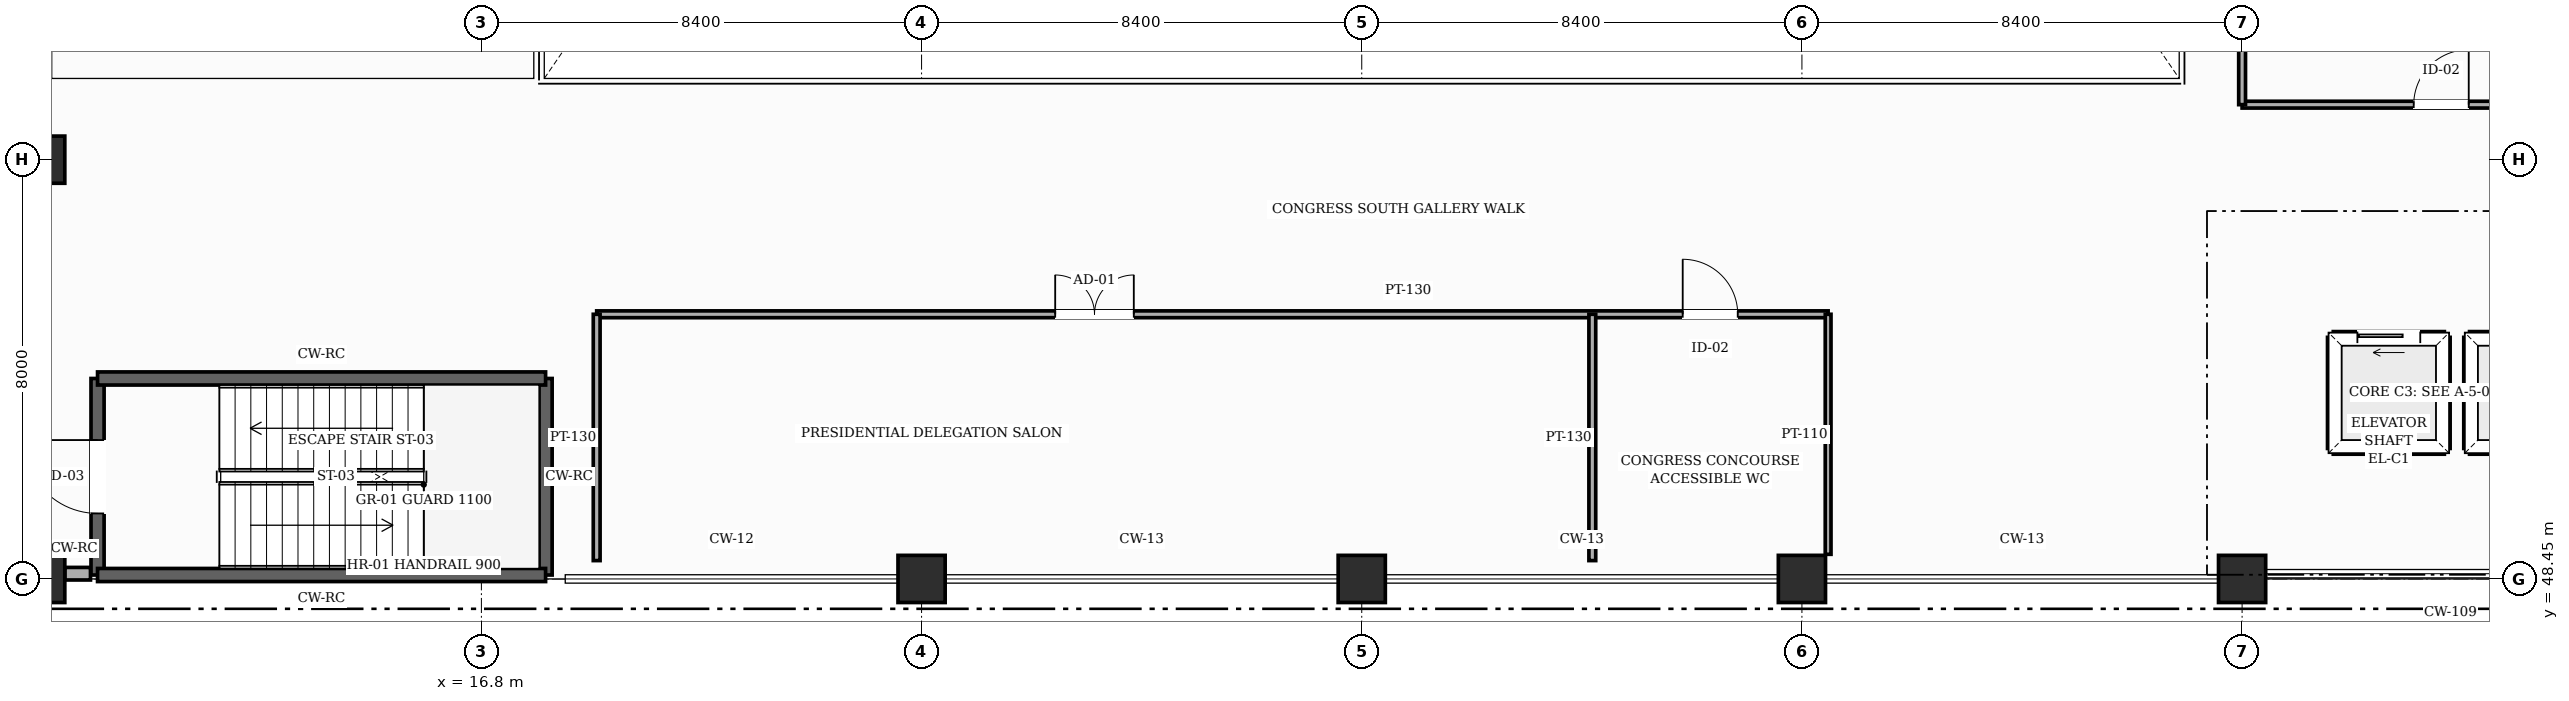
"""IFC4 building model, lengths in metres.
Left out: names, types, materials, properties, quantities, classifications, styles, units other than length and angle.
Written with IfcOpenShell. Run it as: python <this file> out.ifc"""

import sys

from ifc_helpers import new_model, si_unit, direction, frame, frame_2d, origin, origin_2d, place, context, subcontext, project, spatial, rectangle, hollow_rectangle, extrude, element, fill, save


model = new_model("IFC4")
c1 = context("Model", 3, precision=1e-05, world=origin(), true_north=direction((0.0, 1.0)))
c2 = subcontext(c1, "Body", "Model", "MODEL_VIEW")
j1 = project(units=[si_unit("LENGTHUNIT", "METRE"), si_unit("PLANEANGLEUNIT", "RADIAN")], contexts=[c1])
p1 = place(None, origin())
s1 = spatial("IfcSite", under=j1, at=p1, CompositionType="ELEMENT")
p2 = place(p1, origin())
s2 = spatial("IfcBuilding", under=s1, at=p2, CompositionType="ELEMENT")
p3 = place(p2, frame((0.0, 0.0, 5.4)))
s3 = spatial("IfcBuildingStorey", under=s2, at=p3, CompositionType="ELEMENT", Elevation=5.4)
for number, where, z_axis, x_axis in (
    (1, (8.4, 48.45, 0.0), (0.0, 0.0, 1.0), (1.0, 0.0, 0.0)),
    (2, (8.4, 56.45, 0.0), (0.0, 0.0, 1.0), (1.0, 0.0, 0.0)),
    (3, (25.2, 48.45, 0.0), (0.0, 0.0, 1.0), (1.0, 0.0, 0.0)),
    (4, (33.6, 48.45, 0.0), (0.0, 0.0, 1.0), (1.0, 0.0, 0.0)),
    (5, (42.0, 48.45, 0.0), (0.0, 0.0, 1.0), (1.0, 0.0, 0.0)),
    (6, (50.4, 48.45, 0.0), (0.0, 0.0, 1.0), (1.0, 0.0, 0.0)),
):
    element("IfcColumn", number, at=place(p3, frame(where, z_axis=z_axis, x_axis=x_axis)), inside=s3, PredefinedType="COLUMN", context=c2, shape_type="SweptSolid", body=[
        extrude(hollow_rectangle(XDim=0.9, YDim=0.9, WallThickness=0.032, InnerFilletRadius=0.032, OuterFilletRadius=0.064, at=origin_2d()), origin(), (0.0, 0.0, 1.0), 4.8),
    ])
p4 = place(p3, frame((9.34, 48.55, 0.0), z_axis=(0.0, 0.0, 1.0), x_axis=(-1.0, 0.0, 0.0)))
e7 = element("IfcWall", 7, at=p4, inside=s3, PredefinedType="SOLIDWALL", context=c2, shape_type="SweptSolid", body=[
    extrude(rectangle(XDim=0.49, YDim=0.24, at=frame_2d((0.245, 0.0))), origin(), (0.0, 0.0, 1.0), 3.525),
])
p5 = place(p3, frame((9.475, 48.525, 0.0), z_axis=(0.0, 0.0, 1.0), x_axis=(0.0, 1.0, 0.0)))
e8 = element("IfcWall", 8, at=p5, inside=s3, PredefinedType="SHEAR", context=c2, shape_type="SweptSolid", body=[
    extrude(rectangle(XDim=3.75, YDim=0.25, at=frame_2d((1.875, 0.0))), origin(), (0.0, 0.0, 1.0), 4.55),
])
p6 = place(p5, frame((1.175, 0.0, 0.0)))
e9 = element("IfcOpeningElement", 9, at=p6, cuts=e8, PredefinedType="OPENING", context=c2, shape_type="SweptSolid", body=[
    extrude(rectangle(XDim=1.4, YDim=2.25, at=frame_2d((0.7, 1.125))), frame((0.0, 0.135, 0.0), z_axis=(0.0, -1.0, 0.0), x_axis=(1.0, 0.0, 0.0)), (0.0, 0.0, 1.0), 0.27),
])
p7 = place(p3, frame((18.025, 52.275, 0.0), z_axis=(0.0, 0.0, 1.0), x_axis=(0.0, -1.0, 0.0)))
e10 = element("IfcWall", 10, at=p7, inside=s3, PredefinedType="SHEAR", context=c2, shape_type="SweptSolid", body=[
    extrude(rectangle(XDim=3.75, YDim=0.25, at=frame_2d((1.875, 0.0))), origin(), (0.0, 0.0, 1.0), 4.55),
])
for number, where, z_axis, x_axis in (
    (11, (18.025, 48.525, 0.0), (0.0, 0.0, 1.0), (-1.0, 0.0, 0.0)),
    (12, (9.475, 52.275, 0.0), (0.0, 0.0, 1.0), (1.0, 0.0, 0.0)),
):
    element("IfcWall", number, at=place(p3, frame(where, z_axis=z_axis, x_axis=x_axis)), inside=s3, PredefinedType="SHEAR", context=c2, shape_type="SweptSolid", body=[
        extrude(rectangle(XDim=8.55, YDim=0.25, at=frame_2d((4.275, 0.0))), origin(), (0.0, 0.0, 1.0), 4.55),
    ])
p8 = place(p3, frame((52.14, 53.06, 0.0), z_axis=(0.0, 0.0, 1.0), x_axis=(1.0, 0.0, 0.0)))
e13 = element("IfcWall", 13, at=p8, inside=s3, PredefinedType="SHEAR", context=c2, shape_type="SweptSolid", body=[
    extrude(rectangle(XDim=2.12, YDim=0.22, at=frame_2d((1.06, 0.0))), origin(), (0.0, 0.0, 1.0), 4.55),
])
p9 = place(p8, frame((0.46, 0.0, 0.0)))
e14 = element("IfcOpeningElement", 14, at=p9, cuts=e13, PredefinedType="OPENING", context=c2, shape_type="SweptSolid", body=[
    extrude(rectangle(XDim=1.2, YDim=2.25, at=frame_2d((0.6, 1.125))), frame((0.0, 0.12, 0.0), z_axis=(0.0, -1.0, 0.0), x_axis=(1.0, 0.0, 0.0)), (0.0, 0.0, 1.0), 0.24),
])
for number, where, z_axis, x_axis in (
    (15, (52.14, 50.94, 0.0), (0.0, 0.0, 1.0), (1.0, 0.0, 0.0)),
    (16, (54.26, 50.94, 0.0), (0.0, 0.0, 1.0), (0.0, 1.0, 0.0)),
    (17, (52.14, 50.94, 0.0), (0.0, 0.0, 1.0), (0.0, 1.0, 0.0)),
):
    element("IfcWall", number, at=place(p3, frame(where, z_axis=z_axis, x_axis=x_axis)), inside=s3, PredefinedType="SHEAR", context=c2, shape_type="SweptSolid", body=[
        extrude(rectangle(XDim=2.12, YDim=0.22, at=frame_2d((1.06, 0.0))), origin(), (0.0, 0.0, 1.0), 4.55),
    ])
p10 = place(p3, frame((54.74, 53.06, 0.0), z_axis=(0.0, 0.0, 1.0), x_axis=(1.0, 0.0, 0.0)))
e18 = element("IfcWall", 18, at=p10, inside=s3, PredefinedType="SHEAR", context=c2, shape_type="SweptSolid", body=[
    extrude(rectangle(XDim=2.12, YDim=0.22, at=frame_2d((1.06, 0.0))), origin(), (0.0, 0.0, 1.0), 4.55),
])
p11 = place(p10, frame((0.46, 0.0, 0.0)))
e19 = element("IfcOpeningElement", 19, at=p11, cuts=e18, PredefinedType="OPENING", context=c2, shape_type="SweptSolid", body=[
    extrude(rectangle(XDim=1.2, YDim=2.25, at=frame_2d((0.6, 1.125))), frame((0.0, 0.12, 0.0), z_axis=(0.0, -1.0, 0.0), x_axis=(1.0, 0.0, 0.0)), (0.0, 0.0, 1.0), 0.24),
])
for number, where, z_axis, x_axis in (
    (20, (54.74, 50.94, 0.0), (0.0, 0.0, 1.0), (1.0, 0.0, 0.0)),
    (21, (54.74, 50.94, 0.0), (0.0, 0.0, 1.0), (0.0, 1.0, 0.0)),
):
    element("IfcWall", number, at=place(p3, frame(where, z_axis=z_axis, x_axis=x_axis)), inside=s3, PredefinedType="SHEAR", context=c2, shape_type="SweptSolid", body=[
        extrude(rectangle(XDim=2.12, YDim=0.22, at=frame_2d((1.06, 0.0))), origin(), (0.0, 0.0, 1.0), 4.55),
    ])
p12 = place(p3, frame((19.0, 53.5, 0.0), z_axis=(0.0, 0.0, 1.0), x_axis=(1.0, 0.0, 0.0)))
e22 = element("IfcWall", 22, at=p12, inside=s3, PredefinedType="PARTITIONING", context=c2, shape_type="SweptSolid", body=[
    extrude(rectangle(XDim=23.5, YDim=0.13, at=frame_2d((11.75, 0.0))), origin(), (0.0, 0.0, 1.0), 4.535),
])
p13 = place(p12, frame((8.75, 0.0, 0.0)))
e23 = element("IfcOpeningElement", 23, at=p13, cuts=e22, PredefinedType="OPENING", context=c2, shape_type="SweptSolid", body=[
    extrude(rectangle(XDim=1.5, YDim=2.3, at=frame_2d((0.75, 1.15))), frame((0.0, 0.075, 0.0), z_axis=(0.0, -1.0, 0.0), x_axis=(1.0, 0.0, 0.0)), (0.0, 0.0, 1.0), 0.15),
])
p14 = place(p12, frame((20.725, 0.0, 0.0)))
e24 = element("IfcOpeningElement", 24, at=p14, cuts=e22, PredefinedType="OPENING", context=c2, shape_type="SweptSolid", body=[
    extrude(rectangle(XDim=1.05, YDim=2.2, at=frame_2d((0.525, 1.1))), frame((0.0, 0.075, 0.0), z_axis=(0.0, -1.0, 0.0), x_axis=(1.0, 0.0, 0.0)), (0.0, 0.0, 1.0), 0.15),
])
p15 = place(p3, frame((50.4, 57.5, 0.0), z_axis=(0.0, 0.0, 1.0), x_axis=(1.0, 0.0, 0.0)))
e25 = element("IfcWall", 25, at=p15, inside=s3, PredefinedType="PARTITIONING", context=c2, shape_type="SweptSolid", body=[
    extrude(rectangle(XDim=7.6, YDim=0.13, at=frame_2d((3.8, 0.0))), origin(), (0.0, 0.0, 1.0), 4.535),
])
p16 = place(p15, frame((3.275, 0.0, 0.0)))
e26 = element("IfcOpeningElement", 26, at=p16, cuts=e25, PredefinedType="OPENING", context=c2, shape_type="SweptSolid", body=[
    extrude(rectangle(XDim=1.05, YDim=2.2, at=frame_2d((0.525, 1.1))), frame((0.0, 0.075, 0.0), z_axis=(0.0, -1.0, 0.0), x_axis=(1.0, 0.0, 0.0)), (0.0, 0.0, 1.0), 0.15),
])
for number, where, z_axis, x_axis in (
    (27, (19.0, 48.8, 0.0), (0.0, 0.0, 1.0), (0.0, 1.0, 0.0)),
    (28, (38.0, 48.8, 0.0), (0.0, 0.0, 1.0), (0.0, 1.0, 0.0)),
):
    element("IfcWall", number, at=place(p3, frame(where, z_axis=z_axis, x_axis=x_axis)), inside=s3, PredefinedType="PARTITIONING", context=c2, shape_type="SweptSolid", body=[
        extrude(rectangle(XDim=4.7, YDim=0.13, at=frame_2d((2.35, 0.0))), origin(), (0.0, 0.0, 1.0), 4.535),
    ])
p17 = place(p3, frame((42.5, 48.92, 0.0), z_axis=(0.0, 0.0, 1.0), x_axis=(0.0, 1.0, 0.0)))
e29 = element("IfcWall", 29, at=p17, inside=s3, PredefinedType="PARTITIONING", context=c2, shape_type="SweptSolid", body=[
    extrude(rectangle(XDim=4.58, YDim=0.11, at=frame_2d((2.29, 0.0))), origin(), (0.0, 0.0, 1.0), 4.535),
])
p18 = place(p3, frame((50.4, 57.5, 0.0), z_axis=(0.0, 0.0, 1.0), x_axis=(0.0, 1.0, 0.0)))
e30 = element("IfcWall", 30, at=p18, inside=s3, PredefinedType="PARTITIONING", context=c2, shape_type="SweptSolid", body=[
    extrude(rectangle(XDim=30.5, YDim=0.13, at=frame_2d((15.25, 0.0))), origin(), (0.0, 0.0, 1.0), 4.535),
])
p19 = place(p6, origin())
e31 = element("IfcDoor", 31, at=p19, inside=s3, OperationType="SINGLE_SWING_RIGHT", PredefinedType="DOOR", context=c2, shape_type="SweptSolid", body=[
    extrude(rectangle(XDim=1.4, YDim=2.25, at=frame_2d((0.7, 1.125))), frame((0.0, 0.025, 0.0), z_axis=(0.0, -1.0, 0.0), x_axis=(1.0, 0.0, 0.0)), (0.0, 0.0, 1.0), 0.05),
])
fill(e9, e31)
p20 = place(p9, origin())
e32 = element("IfcDoor", 32, at=p20, inside=s3, OperationType="SLIDING_TO_LEFT", PredefinedType="DOOR", context=c2, shape_type="SweptSolid", body=[
    extrude(rectangle(XDim=1.2, YDim=2.25, at=frame_2d((0.6, 1.125))), frame((0.0, 0.025, 0.0), z_axis=(0.0, -1.0, 0.0), x_axis=(1.0, 0.0, 0.0)), (0.0, 0.0, 1.0), 0.05),
])
fill(e14, e32)
p21 = place(p13, origin())
e33 = element("IfcDoor", 33, at=p21, inside=s3, OperationType="DOUBLE_DOOR_SINGLE_SWING", PredefinedType="DOOR", context=c2, shape_type="SweptSolid", body=[
    extrude(rectangle(XDim=1.5, YDim=2.3, at=frame_2d((0.75, 1.15))), frame((0.0, 0.025, 0.0), z_axis=(0.0, -1.0, 0.0), x_axis=(1.0, 0.0, 0.0)), (0.0, 0.0, 1.0), 0.05),
])
fill(e23, e33)
p22 = place(p16, origin())
e34 = element("IfcDoor", 34, at=p22, inside=s3, OperationType="SINGLE_SWING_RIGHT", PredefinedType="DOOR", context=c2, shape_type="SweptSolid", body=[
    extrude(rectangle(XDim=1.05, YDim=2.2, at=frame_2d((0.525, 1.1))), frame((0.0, 0.025, 0.0), z_axis=(0.0, -1.0, 0.0), x_axis=(1.0, 0.0, 0.0)), (0.0, 0.0, 1.0), 0.05),
])
fill(e26, e34)
p23 = place(p14, origin())
e35 = element("IfcDoor", 35, at=p23, inside=s3, OperationType="SINGLE_SWING_LEFT", PredefinedType="DOOR", context=c2, shape_type="SweptSolid", body=[
    extrude(rectangle(XDim=1.05, YDim=2.2, at=frame_2d((0.525, 1.1))), frame((0.0, 0.025, 0.0), z_axis=(0.0, -1.0, 0.0), x_axis=(1.0, 0.0, 0.0)), (0.0, 0.0, 1.0), 0.05),
])
fill(e24, e35)
save(model, sys.argv[1])
